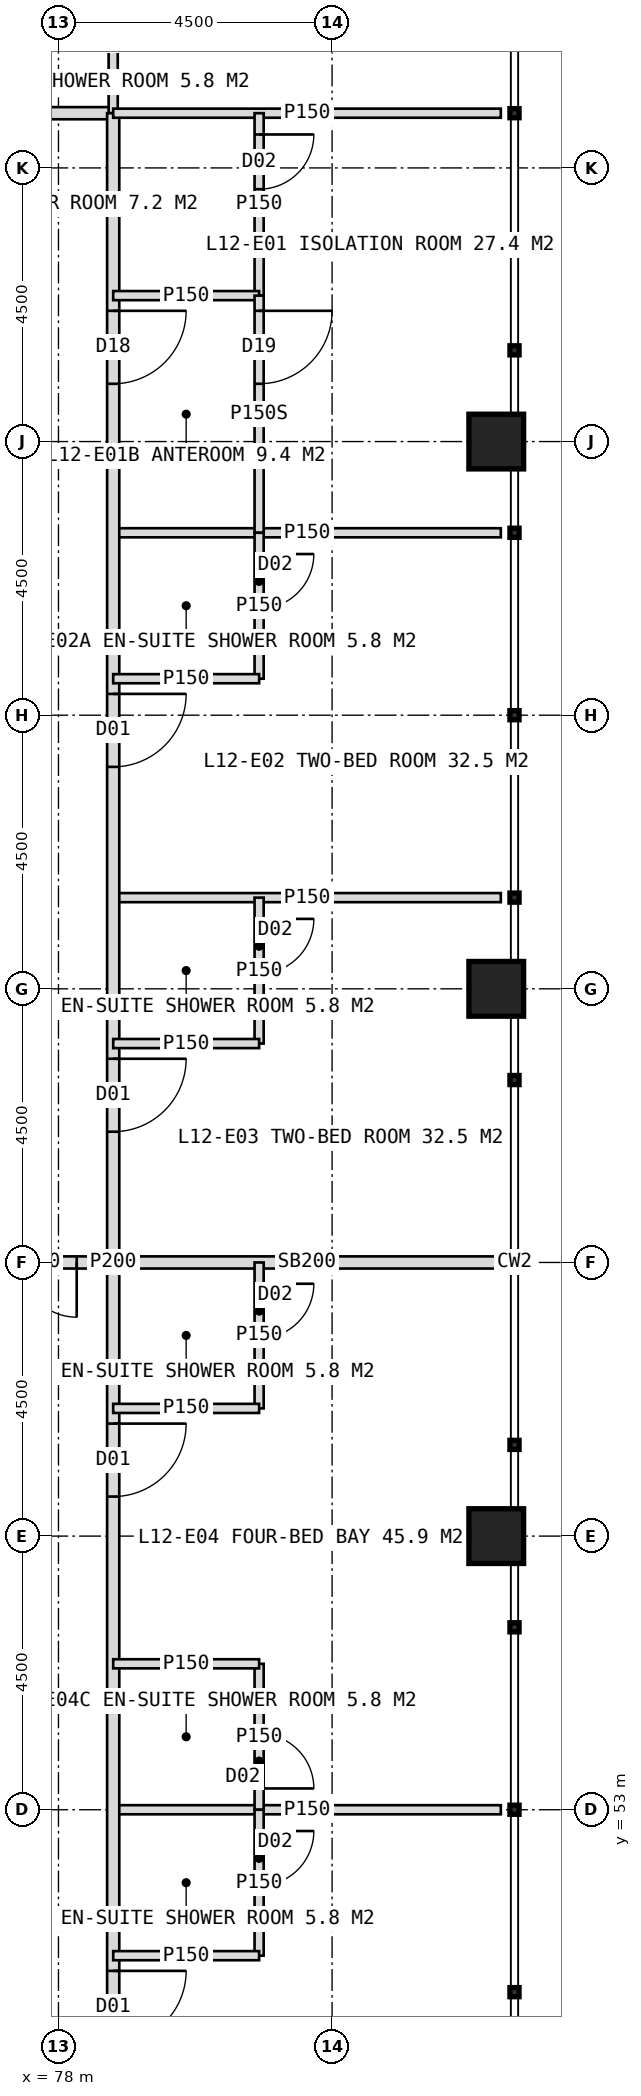
"""IFC4 building model, lengths in metres.
Left out: names, types, materials, properties, quantities, classifications, styles, units other than length and angle.
Written with IfcOpenShell. Run it as: python <this file> out.ifc"""

import sys

from ifc_helpers import new_model, si_unit, direction, frame, frame_2d, origin, origin_2d, place, context, subcontext, project, spatial, rectangle, hollow_rectangle, extrude, element, fill, save


model = new_model("IFC4")
c1 = context("Model", 3, precision=1e-05, world=origin(), true_north=direction((0.0, 1.0)))
c2 = subcontext(c1, "Body", "Model", "MODEL_VIEW")
j1 = project(units=[si_unit("LENGTHUNIT", "METRE"), si_unit("PLANEANGLEUNIT", "RADIAN")], contexts=[c1])
p1 = place(None, origin())
s1 = spatial("IfcSite", under=j1, at=p1, CompositionType="ELEMENT")
p2 = place(p1, origin())
s2 = spatial("IfcBuilding", under=s1, at=p2, CompositionType="ELEMENT")
p3 = place(p2, frame((0.0, 0.0, 55.0)))
s3 = spatial("IfcBuildingStorey", under=s2, at=p3, CompositionType="ELEMENT", Elevation=55.0)
for number, where, z_axis, x_axis in (
    (1, (85.2, 57.5, 0.0), (0.0, 0.0, 1.0), (1.0, 0.0, 0.0)),
    (2, (85.2, 66.5, 0.0), (0.0, 0.0, 1.0), (1.0, 0.0, 0.0)),
    (3, (85.2, 75.5, 0.0), (0.0, 0.0, 1.0), (1.0, 0.0, 0.0)),
):
    element("IfcColumn", number, at=place(p3, frame(where, z_axis=z_axis, x_axis=x_axis)), inside=s3, PredefinedType="COLUMN", context=c2, shape_type="SweptSolid", body=[
        extrude(hollow_rectangle(XDim=0.9, YDim=0.9, WallThickness=0.08, at=origin_2d()), origin(), (0.0, 0.0, 1.0), 4.0),
    ])
p4 = place(p3, frame((41.1, 80.9, 0.0), z_axis=(0.0, 0.0, 1.0), x_axis=(1.0, 0.0, 0.0)))
e4 = element("IfcWall", 4, at=p4, inside=s3, PredefinedType="PARTITIONING", context=c2, shape_type="SweptSolid", body=[
    extrude(rectangle(XDim=37.8, YDim=0.2, at=frame_2d((18.9, 0.0))), origin(), (0.0, 0.0, 1.0), 3.75),
])
p5 = place(p4, frame((3.25, 0.0, 0.0)))
e5 = element("IfcOpeningElement", 5, at=p5, cuts=e4, PredefinedType="OPENING", context=c2, shape_type="SweptSolid", body=[
    extrude(rectangle(XDim=1.2, YDim=2.2, at=frame_2d((0.6, 1.1))), frame((0.0, 0.11, 0.0), z_axis=(0.0, -1.0, 0.0), x_axis=(1.0, 0.0, 0.0)), (0.0, 0.0, 1.0), 0.22),
])
p6 = place(p4, frame((9.55, 0.0, 0.0)))
e6 = element("IfcOpeningElement", 6, at=p6, cuts=e4, PredefinedType="OPENING", context=c2, shape_type="SweptSolid", body=[
    extrude(rectangle(XDim=1.2, YDim=2.2, at=frame_2d((0.6, 1.1))), frame((0.0, 0.11, 0.0), z_axis=(0.0, -1.0, 0.0), x_axis=(1.0, 0.0, 0.0)), (0.0, 0.0, 1.0), 0.22),
])
p7 = place(p4, frame((15.55, 0.0, 0.0)))
e7 = element("IfcOpeningElement", 7, at=p7, cuts=e4, PredefinedType="OPENING", context=c2, shape_type="SweptSolid", body=[
    extrude(rectangle(XDim=1.2, YDim=2.2, at=frame_2d((0.6, 1.1))), frame((0.0, 0.11, 0.0), z_axis=(0.0, -1.0, 0.0), x_axis=(1.0, 0.0, 0.0)), (0.0, 0.0, 1.0), 0.22),
])
p8 = place(p4, frame((21.4, 0.0, 0.0)))
e8 = element("IfcOpeningElement", 8, at=p8, cuts=e4, PredefinedType="OPENING", context=c2, shape_type="SweptSolid", body=[
    extrude(rectangle(XDim=1.0, YDim=2.1, at=frame_2d((0.5, 1.05))), frame((0.0, 0.11, 0.0), z_axis=(0.0, -1.0, 0.0), x_axis=(1.0, 0.0, 0.0)), (0.0, 0.0, 1.0), 0.22),
])
p9 = place(p4, frame((27.55, 0.0, 0.0)))
e9 = element("IfcOpeningElement", 9, at=p9, cuts=e4, PredefinedType="OPENING", context=c2, shape_type="SweptSolid", body=[
    extrude(rectangle(XDim=1.2, YDim=2.2, at=frame_2d((0.6, 1.1))), frame((0.0, 0.11, 0.0), z_axis=(0.0, -1.0, 0.0), x_axis=(1.0, 0.0, 0.0)), (0.0, 0.0, 1.0), 0.22),
])
p10 = place(p3, frame((78.9, 80.9, 0.0), z_axis=(0.0, 0.0, 1.0), x_axis=(0.0, 1.0, 0.0)))
e10 = element("IfcWall", 10, at=p10, inside=s3, PredefinedType="PARTITIONING", context=c2, shape_type="SweptSolid", body=[
    extrude(rectangle(XDim=2.4, YDim=0.15, at=frame_2d((1.2, 0.0))), origin(), (0.0, 0.0, 1.0), 3.75),
])
for number, where, z_axis, x_axis in (
    (11, (78.9, 74.0, 0.0), (0.0, 0.0, 1.0), (1.0, 0.0, 0.0)),
    (12, (78.9, 68.0, 0.0), (0.0, 0.0, 1.0), (1.0, 0.0, 0.0)),
):
    element("IfcWall", number, at=place(p3, frame(where, z_axis=z_axis, x_axis=x_axis)), inside=s3, PredefinedType="PARTITIONING", context=c2, shape_type="SweptSolid", body=[
        extrude(rectangle(XDim=6.375, YDim=0.15, at=frame_2d((3.188, 0.0))), origin(), (0.0, 0.0, 1.0), 3.75),
    ])
p11 = place(p3, frame((78.9, 62.0, 0.0), z_axis=(0.0, 0.0, 1.0), x_axis=(1.0, 0.0, 0.0)))
e13 = element("IfcWall", 13, at=p11, inside=s3, PredefinedType="SOLIDWALL", context=c2, shape_type="SweptSolid", body=[
    extrude(rectangle(XDim=6.375, YDim=0.2, at=frame_2d((3.188, 0.0))), origin(), (0.0, 0.0, 1.0), 2.75),
])
p12 = place(p3, frame((78.9, 53.0, 0.0), z_axis=(0.0, 0.0, 1.0), x_axis=(1.0, 0.0, 0.0)))
e14 = element("IfcWall", 14, at=p12, inside=s3, PredefinedType="PARTITIONING", context=c2, shape_type="SweptSolid", body=[
    extrude(rectangle(XDim=6.375, YDim=0.15, at=frame_2d((3.188, 0.0))), origin(), (0.0, 0.0, 1.0), 3.75),
])
p13 = place(p3, frame((78.9, 80.9, 0.0), z_axis=(0.0, 0.0, 1.0), x_axis=(0.0, -1.0, 0.0)))
e15 = element("IfcWall", 15, at=p13, inside=s3, PredefinedType="PARTITIONING", context=c2, shape_type="SweptSolid", body=[
    extrude(rectangle(XDim=37.8, YDim=0.2, at=frame_2d((18.9, 0.0))), origin(), (0.0, 0.0, 1.0), 3.75),
])
p14 = place(p13, frame((3.25, 0.0, 0.0)))
e16 = element("IfcOpeningElement", 16, at=p14, cuts=e15, PredefinedType="OPENING", context=c2, shape_type="SweptSolid", body=[
    extrude(rectangle(XDim=1.2, YDim=2.2, at=frame_2d((0.6, 1.1))), frame((0.0, 0.11, 0.0), z_axis=(0.0, -1.0, 0.0), x_axis=(1.0, 0.0, 0.0)), (0.0, 0.0, 1.0), 0.22),
])
p15 = place(p13, frame((9.55, 0.0, 0.0)))
e17 = element("IfcOpeningElement", 17, at=p15, cuts=e15, PredefinedType="OPENING", context=c2, shape_type="SweptSolid", body=[
    extrude(rectangle(XDim=1.2, YDim=2.2, at=frame_2d((0.6, 1.1))), frame((0.0, 0.11, 0.0), z_axis=(0.0, -1.0, 0.0), x_axis=(1.0, 0.0, 0.0)), (0.0, 0.0, 1.0), 0.22),
])
p16 = place(p13, frame((15.55, 0.0, 0.0)))
e18 = element("IfcOpeningElement", 18, at=p16, cuts=e15, PredefinedType="OPENING", context=c2, shape_type="SweptSolid", body=[
    extrude(rectangle(XDim=1.2, YDim=2.2, at=frame_2d((0.6, 1.1))), frame((0.0, 0.11, 0.0), z_axis=(0.0, -1.0, 0.0), x_axis=(1.0, 0.0, 0.0)), (0.0, 0.0, 1.0), 0.22),
])
p17 = place(p13, frame((21.55, 0.0, 0.0)))
e19 = element("IfcOpeningElement", 19, at=p17, cuts=e15, PredefinedType="OPENING", context=c2, shape_type="SweptSolid", body=[
    extrude(rectangle(XDim=1.2, YDim=2.2, at=frame_2d((0.6, 1.1))), frame((0.0, 0.11, 0.0), z_axis=(0.0, -1.0, 0.0), x_axis=(1.0, 0.0, 0.0)), (0.0, 0.0, 1.0), 0.22),
])
p18 = place(p13, frame((30.55, 0.0, 0.0)))
e20 = element("IfcOpeningElement", 20, at=p18, cuts=e15, PredefinedType="OPENING", context=c2, shape_type="SweptSolid", body=[
    extrude(rectangle(XDim=1.2, YDim=2.2, at=frame_2d((0.6, 1.1))), frame((0.0, 0.11, 0.0), z_axis=(0.0, -1.0, 0.0), x_axis=(1.0, 0.0, 0.0)), (0.0, 0.0, 1.0), 0.22),
])
p19 = place(p3, frame((78.9, 80.9, 0.0), z_axis=(0.0, 0.0, 1.0), x_axis=(1.0, 0.0, 0.0)))
e21 = element("IfcWall", 21, at=p19, inside=s3, PredefinedType="PARTITIONING", context=c2, shape_type="SweptSolid", body=[
    extrude(rectangle(XDim=6.375, YDim=0.15, at=frame_2d((3.188, 0.0))), origin(), (0.0, 0.0, 1.0), 3.75),
])
p20 = place(p3, frame((81.3, 80.9, 0.0), z_axis=(0.0, 0.0, 1.0), x_axis=(0.0, -1.0, 0.0)))
e22 = element("IfcWall", 22, at=p20, inside=s3, PredefinedType="PARTITIONING", context=c2, shape_type="SweptSolid", body=[
    extrude(rectangle(XDim=3.0, YDim=0.15, at=frame_2d((1.5, 0.0))), origin(), (0.0, 0.0, 1.0), 3.75),
])
p21 = place(p20, frame((0.35, 0.0, 0.0)))
e23 = element("IfcOpeningElement", 23, at=p21, cuts=e22, PredefinedType="OPENING", context=c2, shape_type="SweptSolid", body=[
    extrude(rectangle(XDim=0.9, YDim=2.1, at=frame_2d((0.45, 1.05))), frame((0.0, 0.085, 0.0), z_axis=(0.0, -1.0, 0.0), x_axis=(1.0, 0.0, 0.0)), (0.0, 0.0, 1.0), 0.17),
])
p22 = place(p3, frame((78.9, 77.9, 0.0), z_axis=(0.0, 0.0, 1.0), x_axis=(1.0, 0.0, 0.0)))
e24 = element("IfcWall", 24, at=p22, inside=s3, PredefinedType="PARTITIONING", context=c2, shape_type="SweptSolid", body=[
    extrude(rectangle(XDim=2.4, YDim=0.15, at=frame_2d((1.2, 0.0))), origin(), (0.0, 0.0, 1.0), 3.75),
])
p23 = place(p3, frame((81.3, 77.9, 0.0), z_axis=(0.0, 0.0, 1.0), x_axis=(0.0, -1.0, 0.0)))
e25 = element("IfcWall", 25, at=p23, inside=s3, PredefinedType="PARTITIONING", context=c2, shape_type="SweptSolid", body=[
    extrude(rectangle(XDim=3.9, YDim=0.15, at=frame_2d((1.95, 0.0))), origin(), (0.0, 0.0, 1.0), 3.75),
])
p24 = place(p23, frame((0.25, 0.0, 0.0)))
e26 = element("IfcOpeningElement", 26, at=p24, cuts=e25, PredefinedType="OPENING", context=c2, shape_type="SweptSolid", body=[
    extrude(rectangle(XDim=1.2, YDim=2.2, at=frame_2d((0.6, 1.1))), frame((0.0, 0.085, 0.0), z_axis=(0.0, -1.0, 0.0), x_axis=(1.0, 0.0, 0.0)), (0.0, 0.0, 1.0), 0.17),
])
p25 = place(p3, frame((81.3, 74.0, 0.0), z_axis=(0.0, 0.0, 1.0), x_axis=(0.0, -1.0, 0.0)))
e27 = element("IfcWall", 27, at=p25, inside=s3, PredefinedType="PARTITIONING", context=c2, shape_type="SweptSolid", body=[
    extrude(rectangle(XDim=2.4, YDim=0.15, at=frame_2d((1.2, 0.0))), origin(), (0.0, 0.0, 1.0), 3.75),
])
p26 = place(p25, frame((0.35, 0.0, 0.0)))
e28 = element("IfcOpeningElement", 28, at=p26, cuts=e27, PredefinedType="OPENING", context=c2, shape_type="SweptSolid", body=[
    extrude(rectangle(XDim=0.9, YDim=2.1, at=frame_2d((0.45, 1.05))), frame((0.0, 0.085, 0.0), z_axis=(0.0, -1.0, 0.0), x_axis=(1.0, 0.0, 0.0)), (0.0, 0.0, 1.0), 0.17),
])
p27 = place(p3, frame((78.9, 71.6, 0.0), z_axis=(0.0, 0.0, 1.0), x_axis=(1.0, 0.0, 0.0)))
e29 = element("IfcWall", 29, at=p27, inside=s3, PredefinedType="PARTITIONING", context=c2, shape_type="SweptSolid", body=[
    extrude(rectangle(XDim=2.4, YDim=0.15, at=frame_2d((1.2, 0.0))), origin(), (0.0, 0.0, 1.0), 3.75),
])
p28 = place(p3, frame((81.3, 68.0, 0.0), z_axis=(0.0, 0.0, 1.0), x_axis=(0.0, -1.0, 0.0)))
e30 = element("IfcWall", 30, at=p28, inside=s3, PredefinedType="PARTITIONING", context=c2, shape_type="SweptSolid", body=[
    extrude(rectangle(XDim=2.4, YDim=0.15, at=frame_2d((1.2, 0.0))), origin(), (0.0, 0.0, 1.0), 3.75),
])
p29 = place(p28, frame((0.35, 0.0, 0.0)))
e31 = element("IfcOpeningElement", 31, at=p29, cuts=e30, PredefinedType="OPENING", context=c2, shape_type="SweptSolid", body=[
    extrude(rectangle(XDim=0.9, YDim=2.1, at=frame_2d((0.45, 1.05))), frame((0.0, 0.085, 0.0), z_axis=(0.0, -1.0, 0.0), x_axis=(1.0, 0.0, 0.0)), (0.0, 0.0, 1.0), 0.17),
])
p30 = place(p3, frame((78.9, 65.6, 0.0), z_axis=(0.0, 0.0, 1.0), x_axis=(1.0, 0.0, 0.0)))
e32 = element("IfcWall", 32, at=p30, inside=s3, PredefinedType="PARTITIONING", context=c2, shape_type="SweptSolid", body=[
    extrude(rectangle(XDim=2.4, YDim=0.15, at=frame_2d((1.2, 0.0))), origin(), (0.0, 0.0, 1.0), 3.75),
])
p31 = place(p3, frame((81.3, 62.0, 0.0), z_axis=(0.0, 0.0, 1.0), x_axis=(0.0, -1.0, 0.0)))
e33 = element("IfcWall", 33, at=p31, inside=s3, PredefinedType="PARTITIONING", context=c2, shape_type="SweptSolid", body=[
    extrude(rectangle(XDim=2.4, YDim=0.15, at=frame_2d((1.2, 0.0))), origin(), (0.0, 0.0, 1.0), 3.75),
])
p32 = place(p31, frame((0.35, 0.0, 0.0)))
e34 = element("IfcOpeningElement", 34, at=p32, cuts=e33, PredefinedType="OPENING", context=c2, shape_type="SweptSolid", body=[
    extrude(rectangle(XDim=0.9, YDim=2.1, at=frame_2d((0.45, 1.05))), frame((0.0, 0.085, 0.0), z_axis=(0.0, -1.0, 0.0), x_axis=(1.0, 0.0, 0.0)), (0.0, 0.0, 1.0), 0.17),
])
p33 = place(p3, frame((78.9, 59.6, 0.0), z_axis=(0.0, 0.0, 1.0), x_axis=(1.0, 0.0, 0.0)))
e35 = element("IfcWall", 35, at=p33, inside=s3, PredefinedType="PARTITIONING", context=c2, shape_type="SweptSolid", body=[
    extrude(rectangle(XDim=2.4, YDim=0.15, at=frame_2d((1.2, 0.0))), origin(), (0.0, 0.0, 1.0), 3.75),
])
p34 = place(p3, frame((81.3, 55.4, 0.0), z_axis=(0.0, 0.0, 1.0), x_axis=(0.0, -1.0, 0.0)))
e36 = element("IfcWall", 36, at=p34, inside=s3, PredefinedType="PARTITIONING", context=c2, shape_type="SweptSolid", body=[
    extrude(rectangle(XDim=2.4, YDim=0.15, at=frame_2d((1.2, 0.0))), origin(), (0.0, 0.0, 1.0), 3.75),
])
p35 = place(p34, frame((1.15, 0.0, 0.0)))
e37 = element("IfcOpeningElement", 37, at=p35, cuts=e36, PredefinedType="OPENING", context=c2, shape_type="SweptSolid", body=[
    extrude(rectangle(XDim=0.9, YDim=2.1, at=frame_2d((0.45, 1.05))), frame((0.0, 0.085, 0.0), z_axis=(0.0, -1.0, 0.0), x_axis=(1.0, 0.0, 0.0)), (0.0, 0.0, 1.0), 0.17),
])
p36 = place(p3, frame((78.9, 55.4, 0.0), z_axis=(0.0, 0.0, 1.0), x_axis=(1.0, 0.0, 0.0)))
e38 = element("IfcWall", 38, at=p36, inside=s3, PredefinedType="PARTITIONING", context=c2, shape_type="SweptSolid", body=[
    extrude(rectangle(XDim=2.4, YDim=0.15, at=frame_2d((1.2, 0.0))), origin(), (0.0, 0.0, 1.0), 3.75),
])
p37 = place(p3, frame((81.3, 53.0, 0.0), z_axis=(0.0, 0.0, 1.0), x_axis=(0.0, -1.0, 0.0)))
e39 = element("IfcWall", 39, at=p37, inside=s3, PredefinedType="PARTITIONING", context=c2, shape_type="SweptSolid", body=[
    extrude(rectangle(XDim=2.4, YDim=0.15, at=frame_2d((1.2, 0.0))), origin(), (0.0, 0.0, 1.0), 3.75),
])
p38 = place(p37, frame((0.35, 0.0, 0.0)))
e40 = element("IfcOpeningElement", 40, at=p38, cuts=e39, PredefinedType="OPENING", context=c2, shape_type="SweptSolid", body=[
    extrude(rectangle(XDim=0.9, YDim=2.1, at=frame_2d((0.45, 1.05))), frame((0.0, 0.085, 0.0), z_axis=(0.0, -1.0, 0.0), x_axis=(1.0, 0.0, 0.0)), (0.0, 0.0, 1.0), 0.17),
])
p39 = place(p3, frame((78.9, 50.6, 0.0), z_axis=(0.0, 0.0, 1.0), x_axis=(1.0, 0.0, 0.0)))
e41 = element("IfcWall", 41, at=p39, inside=s3, PredefinedType="PARTITIONING", context=c2, shape_type="SweptSolid", body=[
    extrude(rectangle(XDim=2.4, YDim=0.15, at=frame_2d((1.2, 0.0))), origin(), (0.0, 0.0, 1.0), 3.75),
])
p40 = place(p3, frame((76.2, 62.0, 0.0), z_axis=(0.0, 0.0, 1.0), x_axis=(1.0, 0.0, 0.0)))
e42 = element("IfcWall", 42, at=p40, inside=s3, PredefinedType="SOLIDWALL", context=c2, shape_type="SweptSolid", body=[
    extrude(rectangle(XDim=2.7, YDim=0.2, at=frame_2d((1.35, 0.0))), origin(), (0.0, 0.0, 1.0), 2.75),
])
p41 = place(p40, frame((0.3, 0.0, 0.0)))
e43 = element("IfcOpeningElement", 43, at=p41, cuts=e42, PredefinedType="OPENING", context=c2, shape_type="SweptSolid", body=[
    extrude(rectangle(XDim=1.8, YDim=2.2, at=frame_2d((0.9, 1.1))), frame((0.0, 0.11, 0.0), z_axis=(0.0, -1.0, 0.0), x_axis=(1.0, 0.0, 0.0)), (0.0, 0.0, 1.0), 0.22),
])
p42 = place(p24, origin())
e44 = element("IfcDoor", 44, at=p42, inside=s3, OperationType="SINGLE_SWING_LEFT", PredefinedType="DOOR", context=c2, shape_type="SweptSolid", body=[
    extrude(rectangle(XDim=1.2, YDim=2.2, at=frame_2d((0.6, 1.1))), frame((0.0, 0.025, 0.0), z_axis=(0.0, -1.0, 0.0), x_axis=(1.0, 0.0, 0.0)), (0.0, 0.0, 1.0), 0.05),
])
fill(e26, e44)
p43 = place(p14, origin())
e45 = element("IfcDoor", 45, at=p43, inside=s3, OperationType="SINGLE_SWING_LEFT", PredefinedType="DOOR", context=c2, shape_type="SweptSolid", body=[
    extrude(rectangle(XDim=1.2, YDim=2.2, at=frame_2d((0.6, 1.1))), frame((0.0, 0.025, 0.0), z_axis=(0.0, -1.0, 0.0), x_axis=(1.0, 0.0, 0.0)), (0.0, 0.0, 1.0), 0.05),
])
fill(e16, e45)
p44 = place(p21, origin())
e46 = element("IfcDoor", 46, at=p44, inside=s3, OperationType="SINGLE_SWING_LEFT", PredefinedType="DOOR", context=c2, shape_type="SweptSolid", body=[
    extrude(rectangle(XDim=0.9, YDim=2.1, at=frame_2d((0.45, 1.05))), frame((0.0, 0.025, 0.0), z_axis=(0.0, -1.0, 0.0), x_axis=(1.0, 0.0, 0.0)), (0.0, 0.0, 1.0), 0.05),
])
fill(e23, e46)
p45 = place(p15, origin())
e47 = element("IfcDoor", 47, at=p45, inside=s3, OperationType="SINGLE_SWING_LEFT", PredefinedType="DOOR", context=c2, shape_type="SweptSolid", body=[
    extrude(rectangle(XDim=1.2, YDim=2.2, at=frame_2d((0.6, 1.1))), frame((0.0, 0.025, 0.0), z_axis=(0.0, -1.0, 0.0), x_axis=(1.0, 0.0, 0.0)), (0.0, 0.0, 1.0), 0.05),
])
fill(e17, e47)
p46 = place(p26, origin())
e48 = element("IfcDoor", 48, at=p46, inside=s3, OperationType="SINGLE_SWING_LEFT", PredefinedType="DOOR", context=c2, shape_type="SweptSolid", body=[
    extrude(rectangle(XDim=0.9, YDim=2.1, at=frame_2d((0.45, 1.05))), frame((0.0, 0.025, 0.0), z_axis=(0.0, -1.0, 0.0), x_axis=(1.0, 0.0, 0.0)), (0.0, 0.0, 1.0), 0.05),
])
fill(e28, e48)
p47 = place(p16, origin())
e49 = element("IfcDoor", 49, at=p47, inside=s3, OperationType="SINGLE_SWING_LEFT", PredefinedType="DOOR", context=c2, shape_type="SweptSolid", body=[
    extrude(rectangle(XDim=1.2, YDim=2.2, at=frame_2d((0.6, 1.1))), frame((0.0, 0.025, 0.0), z_axis=(0.0, -1.0, 0.0), x_axis=(1.0, 0.0, 0.0)), (0.0, 0.0, 1.0), 0.05),
])
fill(e18, e49)
p48 = place(p29, origin())
e50 = element("IfcDoor", 50, at=p48, inside=s3, OperationType="SINGLE_SWING_LEFT", PredefinedType="DOOR", context=c2, shape_type="SweptSolid", body=[
    extrude(rectangle(XDim=0.9, YDim=2.1, at=frame_2d((0.45, 1.05))), frame((0.0, 0.025, 0.0), z_axis=(0.0, -1.0, 0.0), x_axis=(1.0, 0.0, 0.0)), (0.0, 0.0, 1.0), 0.05),
])
fill(e31, e50)
p49 = place(p17, origin())
e51 = element("IfcDoor", 51, at=p49, inside=s3, OperationType="SINGLE_SWING_LEFT", PredefinedType="DOOR", context=c2, shape_type="SweptSolid", body=[
    extrude(rectangle(XDim=1.2, YDim=2.2, at=frame_2d((0.6, 1.1))), frame((0.0, 0.025, 0.0), z_axis=(0.0, -1.0, 0.0), x_axis=(1.0, 0.0, 0.0)), (0.0, 0.0, 1.0), 0.05),
])
fill(e19, e51)
p50 = place(p32, origin())
e52 = element("IfcDoor", 52, at=p50, inside=s3, OperationType="SINGLE_SWING_LEFT", PredefinedType="DOOR", context=c2, shape_type="SweptSolid", body=[
    extrude(rectangle(XDim=0.9, YDim=2.1, at=frame_2d((0.45, 1.05))), frame((0.0, 0.025, 0.0), z_axis=(0.0, -1.0, 0.0), x_axis=(1.0, 0.0, 0.0)), (0.0, 0.0, 1.0), 0.05),
])
fill(e34, e52)
p51 = place(p35, origin())
e53 = element("IfcDoor", 53, at=p51, inside=s3, OperationType="SINGLE_SWING_RIGHT", PredefinedType="DOOR", context=c2, shape_type="SweptSolid", body=[
    extrude(rectangle(XDim=0.9, YDim=2.1, at=frame_2d((0.45, 1.05))), frame((0.0, 0.025, 0.0), z_axis=(0.0, -1.0, 0.0), x_axis=(1.0, 0.0, 0.0)), (0.0, 0.0, 1.0), 0.05),
])
fill(e37, e53)
p52 = place(p18, origin())
e54 = element("IfcDoor", 54, at=p52, inside=s3, OperationType="SINGLE_SWING_LEFT", PredefinedType="DOOR", context=c2, shape_type="SweptSolid", body=[
    extrude(rectangle(XDim=1.2, YDim=2.2, at=frame_2d((0.6, 1.1))), frame((0.0, 0.025, 0.0), z_axis=(0.0, -1.0, 0.0), x_axis=(1.0, 0.0, 0.0)), (0.0, 0.0, 1.0), 0.05),
])
fill(e20, e54)
p53 = place(p38, origin())
e55 = element("IfcDoor", 55, at=p53, inside=s3, OperationType="SINGLE_SWING_LEFT", PredefinedType="DOOR", context=c2, shape_type="SweptSolid", body=[
    extrude(rectangle(XDim=0.9, YDim=2.1, at=frame_2d((0.45, 1.05))), frame((0.0, 0.025, 0.0), z_axis=(0.0, -1.0, 0.0), x_axis=(1.0, 0.0, 0.0)), (0.0, 0.0, 1.0), 0.05),
])
fill(e40, e55)
p54 = place(p41, origin())
e56 = element("IfcDoor", 56, at=p54, inside=s3, OperationType="DOUBLE_DOOR_DOUBLE_SWING", PredefinedType="DOOR", context=c2, shape_type="SweptSolid", body=[
    extrude(rectangle(XDim=1.8, YDim=2.2, at=frame_2d((0.9, 1.1))), frame((0.0, 0.025, 0.0), z_axis=(0.0, -1.0, 0.0), x_axis=(1.0, 0.0, 0.0)), (0.0, 0.0, 1.0), 0.05),
])
fill(e43, e56)
save(model, sys.argv[1])
